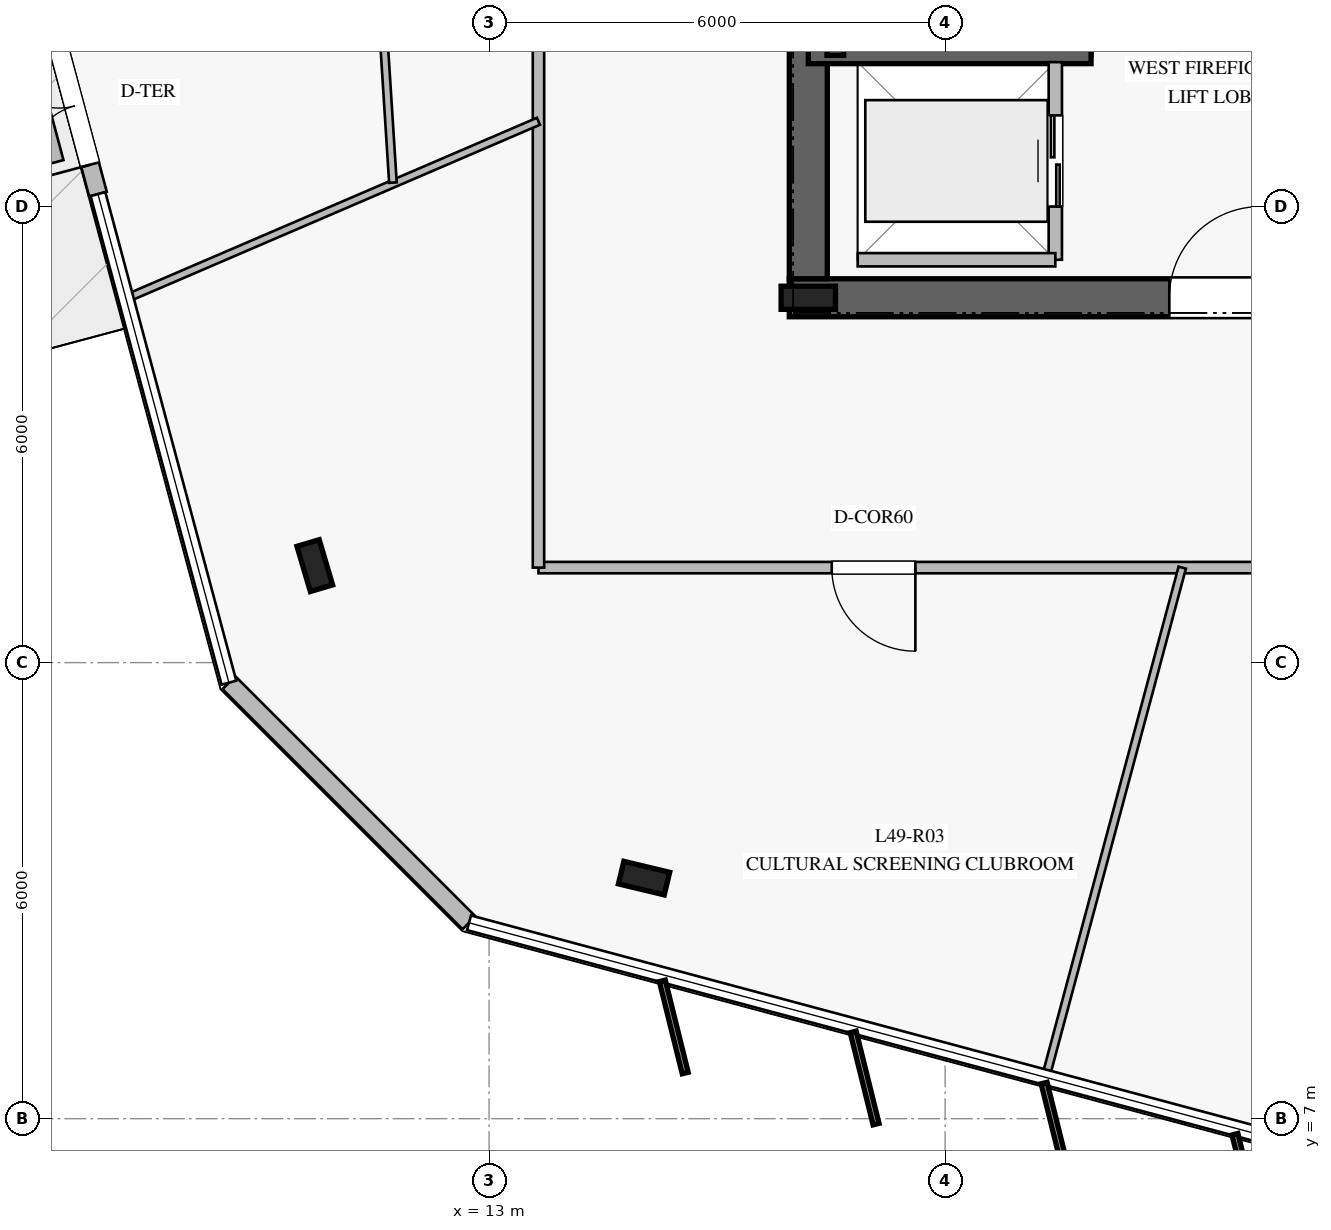
"""IFC4 building model, lengths in metres.
Left out: names, types, materials, properties, quantities, classifications, styles, units other than length and angle.
Written with IfcOpenShell. Run it as: python <this file> out.ifc"""

import sys

from ifc_helpers import new_model, si_unit, direction, frame, frame_2d, origin, origin_2d, place, context, subcontext, project, spatial, rectangle, i_section, extrude, element, fill, save


model = new_model("IFC4")
c1 = context("Model", 3, precision=1e-05, world=origin(), true_north=direction((0.0, 1.0)))
c2 = subcontext(c1, "Body", "Model", "MODEL_VIEW")
j1 = project(units=[si_unit("LENGTHUNIT", "METRE"), si_unit("PLANEANGLEUNIT", "RADIAN")], contexts=[c1])
p1 = place(None, origin())
s1 = spatial("IfcSite", under=j1, at=p1, CompositionType="ELEMENT")
p2 = place(p1, origin())
s2 = spatial("IfcBuilding", under=s1, at=p2, CompositionType="ELEMENT")
p3 = place(p2, frame((0.0, 0.0, 204.8)))
s3 = spatial("IfcBuildingStorey", under=s2, at=p3, CompositionType="ELEMENT", Elevation=204.8)
p4 = place(p3, frame((16.95, 17.8, 0.0), z_axis=(0.0, 0.0, 1.0), x_axis=(1.0, 0.0, 0.0)))
e1 = element("IfcWall", 1, at=p4, inside=s3, PredefinedType="SHEAR", context=c2, shape_type="SweptSolid", body=[
    extrude(rectangle(XDim=16.1, YDim=0.5, at=frame_2d((8.05, 0.0))), origin(), (0.0, 0.0, 1.0), 3.78),
])
p5 = place(p4, frame((5.0, 0.0, 0.0)))
e2 = element("IfcOpeningElement", 2, at=p5, cuts=e1, PredefinedType="OPENING", context=c2, shape_type="SweptSolid", body=[
    extrude(rectangle(XDim=1.2, YDim=2.25, at=frame_2d((0.6, 1.125))), frame((0.0, 0.26, 0.0), z_axis=(0.0, -1.0, 0.0), x_axis=(1.0, 0.0, 0.0)), (0.0, 0.0, 1.0), 0.52),
])
p6 = place(p4, frame((13.95, 0.0, 0.0)))
e3 = element("IfcOpeningElement", 3, at=p6, cuts=e1, PredefinedType="OPENING", context=c2, shape_type="SweptSolid", body=[
    extrude(rectangle(XDim=0.9, YDim=2.1, at=frame_2d((0.45, 1.05))), frame((0.0, 0.26, 0.0), z_axis=(0.0, -1.0, 0.0), x_axis=(1.0, 0.0, 0.0)), (0.0, 0.0, 1.0), 0.52),
])
p7 = place(p4, frame((9.825, 0.0, 0.0)))
e4 = element("IfcOpeningElement", 4, at=p7, cuts=e1, PredefinedType="OPENING", context=c2, shape_type="SweptSolid", body=[
    extrude(rectangle(XDim=1.1, YDim=2.2, at=frame_2d((0.55, 1.1))), frame((0.0, 0.26, 0.0), z_axis=(0.0, -1.0, 0.0), x_axis=(1.0, 0.0, 0.0)), (0.0, 0.0, 1.0), 0.52),
])
p8 = place(p3, frame((17.2, 31.95, 0.0), z_axis=(0.0, 0.0, 1.0), x_axis=(0.0, -1.0, 0.0)))
e5 = element("IfcWall", 5, at=p8, inside=s3, PredefinedType="SHEAR", context=c2, shape_type="SweptSolid", body=[
    extrude(rectangle(XDim=13.9, YDim=0.5, at=frame_2d((6.95, 0.0))), origin(), (0.0, 0.0, 1.0), 3.78),
])
p9 = place(p8, frame((2.1, 0.0, 0.0)))
e6 = element("IfcOpeningElement", 6, at=p9, cuts=e5, PredefinedType="OPENING", context=c2, shape_type="SweptSolid", body=[
    extrude(rectangle(XDim=1.5, YDim=2.2, at=frame_2d((0.75, 1.1))), frame((0.0, 0.26, 0.0), z_axis=(0.0, -1.0, 0.0), x_axis=(1.0, 0.0, 0.0)), (0.0, 0.0, 1.0), 0.52),
])
p10 = place(p3, frame((17.2, 17.8, 0.0), z_axis=(0.0, 0.0, 1.0), x_axis=(1.0, 0.0, 0.0)))
e7 = element("IfcColumn", 7, at=p10, inside=s3, PredefinedType="COLUMN", context=c2, shape_type="SweptSolid", body=[
    extrude(i_section(OverallWidth=0.304, OverallDepth=0.716, WebThickness=0.021, FlangeThickness=0.04, at=origin_2d()), origin(), (0.0, 0.0, 1.0), 4.0),
])
p11 = place(p3, frame((20.81, 20.99, 0.0), z_axis=(0.0, 0.0, 1.0), x_axis=(0.0, 1.0, 0.0)))
e8 = element("IfcWall", 8, at=p11, inside=s3, PredefinedType="SOLIDWALL", context=c2, shape_type="SweptSolid", body=[
    extrude(rectangle(XDim=7.22, YDim=0.22, at=frame_2d((3.61, 0.0))), origin(), (0.0, 0.0, 1.0), 3.78),
])
p12 = place(p11, frame((0.18, 0.0, 0.0)))
e9 = element("IfcOpeningElement", 9, at=p12, cuts=e8, PredefinedType="OPENING", context=c2, shape_type="SweptSolid", body=[
    extrude(rectangle(XDim=1.15, YDim=2.2, at=frame_2d((0.575, 1.1))), frame((0.0, 0.12, 0.0), z_axis=(0.0, -1.0, 0.0), x_axis=(1.0, 0.0, 0.0)), (0.0, 0.0, 1.0), 0.24),
])
p13 = place(p3, frame((17.2, 20.99, 0.0), z_axis=(0.0, 0.0, 1.0), x_axis=(1.0, 0.0, 0.0)))
e10 = element("IfcWall", 10, at=p13, inside=s3, PredefinedType="SOLIDWALL", context=c2, shape_type="SweptSolid", body=[
    extrude(rectangle(XDim=3.72, YDim=0.22, at=frame_2d((1.86, 0.0))), origin(), (0.0, 0.0, 1.0), 3.78),
])
p14 = place(p3, frame((17.555, 28.21, 0.0), z_axis=(0.0, 0.0, 1.0), x_axis=(0.0, -1.0, 0.0)))
e11 = element("IfcWall", 11, at=p14, inside=s3, PredefinedType="SOLIDWALL", context=c2, shape_type="SweptSolid", body=[
    extrude(rectangle(XDim=7.22, YDim=0.22, at=frame_2d((3.61, 0.0))), origin(), (0.0, 0.0, 1.0), 3.78),
])
for number, where, z_axis, x_axis in (
    (12, (10.707, 14.276, 0.0), (0.0, 0.0, 1.0), (-0.284, 0.959, 0.0)),
    (13, (15.039, 10.165, 0.0), (0.0, 0.0, 1.0), (-0.972, 0.233, 0.0)),
):
    element("IfcColumn", number, at=place(p3, frame(where, z_axis=z_axis, x_axis=x_axis)), inside=s3, PredefinedType="COLUMN", context=c2, shape_type="SweptSolid", body=[
        extrude(i_section(OverallWidth=0.305, OverallDepth=0.62, WebThickness=0.021, FlangeThickness=0.04, at=origin_2d()), origin(), (0.0, 0.0, 1.0), 4.0),
    ])
p15 = place(p3, frame((7.233, 21.482, 0.0), z_axis=(0.0, 0.0, 1.0), x_axis=(0.258827623195, -0.965923527755, 0.0)))
e14 = element("IfcWall", 14, at=p15, inside=s3, PredefinedType="STANDARD", context=c2, shape_type="SweptSolid", body=[
    extrude(rectangle(XDim=2.4, YDim=0.24, at=frame_2d((1.2, 0.0))), origin(), (0.0, 0.0, 1.0), 3.78),
])
p16 = place(p15, frame((0.4, 0.0, 0.0)))
e15 = element("IfcOpeningElement", 15, at=p16, cuts=e14, PredefinedType="OPENING", context=c2, shape_type="SweptSolid", body=[
    extrude(rectangle(XDim=1.6, YDim=2.25, at=frame_2d((0.8, 1.125))), frame((0.0, 0.13, 0.0), z_axis=(0.0, -1.0, 0.0), x_axis=(1.0, 0.0, 0.0)), (0.0, 0.0, 1.0), 0.26),
])
p17 = place(p3, frame((9.577, 12.736, 0.0), z_axis=(0.0, 0.0, 1.0), x_axis=(0.707106781187, -0.707106781187, 0.0)))
e16 = element("IfcWall", 16, at=p17, inside=s3, PredefinedType="STANDARD", context=c2, shape_type="SweptSolid", body=[
    extrude(rectangle(XDim=4.468, YDim=0.24, at=frame_2d((2.234, 0.0))), origin(), (0.0, 0.0, 1.0), 3.78),
])
p18 = place(p3, frame((6.958, 20.839, 0.0), z_axis=(0.0, 0.0, 1.0), x_axis=(0.258363777467, -0.966047699906, 0.0)))
e17 = element("IfcWall", 17, at=p18, inside=s3, PredefinedType="USERDEFINED", context=c2, shape_type="SweptSolid", body=[
    extrude(rectangle(XDim=1.3, YDim=0.22, at=frame_2d((0.65, 0.0))), origin(), (0.0, 0.0, 1.0), 0.4),
])
p19 = place(p3, frame((20.45, 18.3, 0.0), z_axis=(0.0, 0.0, 1.0), x_axis=(0.0, 1.0, 0.0)))
e18 = element("IfcWall", 18, at=p19, inside=s3, PredefinedType="PARTITIONING", context=c2, shape_type="SweptSolid", body=[
    extrude(rectangle(XDim=2.6, YDim=0.175, at=frame_2d((1.3, 0.0))), origin(), (0.0, 0.0, 1.0), 3.78),
])
p20 = place(p19, frame((0.7, 0.0, 0.0)))
e19 = element("IfcOpeningElement", 19, at=p20, cuts=e18, PredefinedType="OPENING", context=c2, shape_type="SweptSolid", body=[
    extrude(rectangle(XDim=1.2, YDim=2.2, at=frame_2d((0.6, 1.1))), frame((0.0, 0.098, 0.0), z_axis=(0.0, -1.0, 0.0), x_axis=(1.0, 0.0, 0.0)), (0.0, 0.0, 1.0), 0.195),
])
p21 = place(p3, frame((17.85, 18.3, 0.0), z_axis=(0.0, 0.0, 1.0), x_axis=(1.0, 0.0, 0.0)))
e20 = element("IfcWall", 20, at=p21, inside=s3, PredefinedType="PARTITIONING", context=c2, shape_type="SweptSolid", body=[
    extrude(rectangle(XDim=2.6, YDim=0.175, at=frame_2d((1.3, 0.0))), origin(), (0.0, 0.0, 1.0), 3.78),
])
p22 = place(p3, frame((36.35, 14.25, 0.0), z_axis=(0.0, 0.0, 1.0), x_axis=(-1.0, 0.0, 0.0)))
e21 = element("IfcWall", 21, at=p22, inside=s3, PredefinedType="PARTITIONING", context=c2, shape_type="SweptSolid", body=[
    extrude(rectangle(XDim=22.7, YDim=0.15, at=frame_2d((11.35, 0.0))), origin(), (0.0, 0.0, 1.0), 3.05),
])
p23 = place(p22, frame((17.741, 0.0, 0.0)))
e22 = element("IfcOpeningElement", 22, at=p23, cuts=e21, PredefinedType="OPENING", context=c2, shape_type="SweptSolid", body=[
    extrude(rectangle(XDim=1.1, YDim=2.2, at=frame_2d((0.55, 1.1))), frame((0.0, 0.085, 0.0), z_axis=(0.0, -1.0, 0.0), x_axis=(1.0, 0.0, 0.0)), (0.0, 0.0, 1.0), 0.17),
])
p24 = place(p22, frame((6.735, 0.0, 0.0)))
e23 = element("IfcOpeningElement", 23, at=p24, cuts=e21, PredefinedType="OPENING", context=c2, shape_type="SweptSolid", body=[
    extrude(rectangle(XDim=1.1, YDim=2.2, at=frame_2d((0.55, 1.1))), frame((0.0, 0.085, 0.0), z_axis=(0.0, -1.0, 0.0), x_axis=(1.0, 0.0, 0.0)), (0.0, 0.0, 1.0), 0.17),
])
p25 = place(p3, frame((13.65, 14.25, 0.0), z_axis=(0.0, 0.0, 1.0), x_axis=(0.0, 1.0, 0.0)))
e24 = element("IfcWall", 24, at=p25, inside=s3, PredefinedType="PARTITIONING", context=c2, shape_type="SweptSolid", body=[
    extrude(rectangle(XDim=21.5, YDim=0.15, at=frame_2d((10.75, 0.0))), origin(), (0.0, 0.0, 1.0), 3.02),
])
p26 = place(p25, frame((11.331, 0.0, 0.0)))
e25 = element("IfcOpeningElement", 25, at=p26, cuts=e24, PredefinedType="OPENING", context=c2, shape_type="SweptSolid", body=[
    extrude(rectangle(XDim=1.1, YDim=2.2, at=frame_2d((0.55, 1.1))), frame((0.0, 0.085, 0.0), z_axis=(0.0, -1.0, 0.0), x_axis=(1.0, 0.0, 0.0)), (0.0, 0.0, 1.0), 0.17),
])
p27 = place(p3, frame((13.65, 20.122, 0.0), z_axis=(0.0, 0.0, 1.0), x_axis=(-0.918666330023, -0.395034396074, 0.0)))
e26 = element("IfcWall", 26, at=p27, inside=s3, PredefinedType="MOVABLE", context=c2, shape_type="SweptSolid", body=[
    extrude(rectangle(XDim=5.891, YDim=0.1, at=frame_2d((2.946, 0.0))), origin(), (0.0, 0.0, 1.0), 3.02),
])
p28 = place(p3, frame((22.12, 14.25, 0.0), z_axis=(0.0, 0.0, 1.0), x_axis=(-0.258906402321, -0.965902414759, 0.0)))
e27 = element("IfcWall", 27, at=p28, inside=s3, PredefinedType="MOVABLE", context=c2, shape_type="SweptSolid", body=[
    extrude(rectangle(XDim=6.926, YDim=0.1, at=frame_2d((3.463, 0.0))), origin(), (0.0, 0.0, 1.0), 3.18),
])
p29 = place(p3, frame((10.79, 34.119, 0.0), z_axis=(0.0, 0.0, 1.0), x_axis=(0.063709221748, -0.997968504044, 0.0)))
e28 = element("IfcWall", 28, at=p29, inside=s3, PredefinedType="MOVABLE", context=c2, shape_type="SweptSolid", body=[
    extrude(rectangle(XDim=14.834, YDim=0.1, at=frame_2d((7.417, 0.0))), origin(), (0.0, 0.0, 1.0), 3.02),
])
p30 = place(p29, frame((6.917, 0.0, 0.0)))
e29 = element("IfcOpeningElement", 29, at=p30, cuts=e28, PredefinedType="OPENING", context=c2, shape_type="SweptSolid", body=[
    extrude(rectangle(XDim=1.0, YDim=2.15, at=frame_2d((0.5, 1.075))), frame((0.0, 0.06, 0.0), z_axis=(0.0, -1.0, 0.0), x_axis=(1.0, 0.0, 0.0)), (0.0, 0.0, 1.0), 0.12),
])
p31 = place(p16, frame((1.6, 0.0, 0.0), z_axis=(0.0, 0.0, 1.0), x_axis=(-1.0, 0.0, 0.0)))
e30 = element("IfcDoor", 30, at=p31, inside=s3, OperationType="DOUBLE_DOOR_SINGLE_SWING", PredefinedType="DOOR", context=c2, shape_type="SweptSolid", body=[
    extrude(rectangle(XDim=1.6, YDim=2.25, at=frame_2d((0.8, 1.125))), frame((0.0, 0.025, 0.0), z_axis=(0.0, -1.0, 0.0), x_axis=(1.0, 0.0, 0.0)), (0.0, 0.0, 1.0), 0.05),
])
fill(e15, e30)
p32 = place(p5, origin())
e31 = element("IfcDoor", 31, at=p32, inside=s3, OperationType="SINGLE_SWING_RIGHT", PredefinedType="DOOR", context=c2, shape_type="SweptSolid", body=[
    extrude(rectangle(XDim=1.2, YDim=2.25, at=frame_2d((0.6, 1.125))), frame((0.0, 0.025, 0.0), z_axis=(0.0, -1.0, 0.0), x_axis=(1.0, 0.0, 0.0)), (0.0, 0.0, 1.0), 0.05),
])
fill(e2, e31)
p33 = place(p20, origin())
e32 = element("IfcDoor", 32, at=p33, inside=s3, OperationType="DOUBLE_DOOR_SLIDING", PredefinedType="DOOR", context=c2, shape_type="SweptSolid", body=[
    extrude(rectangle(XDim=1.2, YDim=2.2, at=frame_2d((0.6, 1.1))), frame((0.0, 0.025, 0.0), z_axis=(0.0, -1.0, 0.0), x_axis=(1.0, 0.0, 0.0)), (0.0, 0.0, 1.0), 0.05),
])
fill(e19, e32)
p34 = place(p23, origin())
e33 = element("IfcDoor", 33, at=p34, inside=s3, OperationType="SINGLE_SWING_LEFT", PredefinedType="DOOR", context=c2, shape_type="SweptSolid", body=[
    extrude(rectangle(XDim=1.1, YDim=2.2, at=frame_2d((0.55, 1.1))), frame((0.0, 0.025, 0.0), z_axis=(0.0, -1.0, 0.0), x_axis=(1.0, 0.0, 0.0)), (0.0, 0.0, 1.0), 0.05),
])
fill(e22, e33)
save(model, sys.argv[1])
